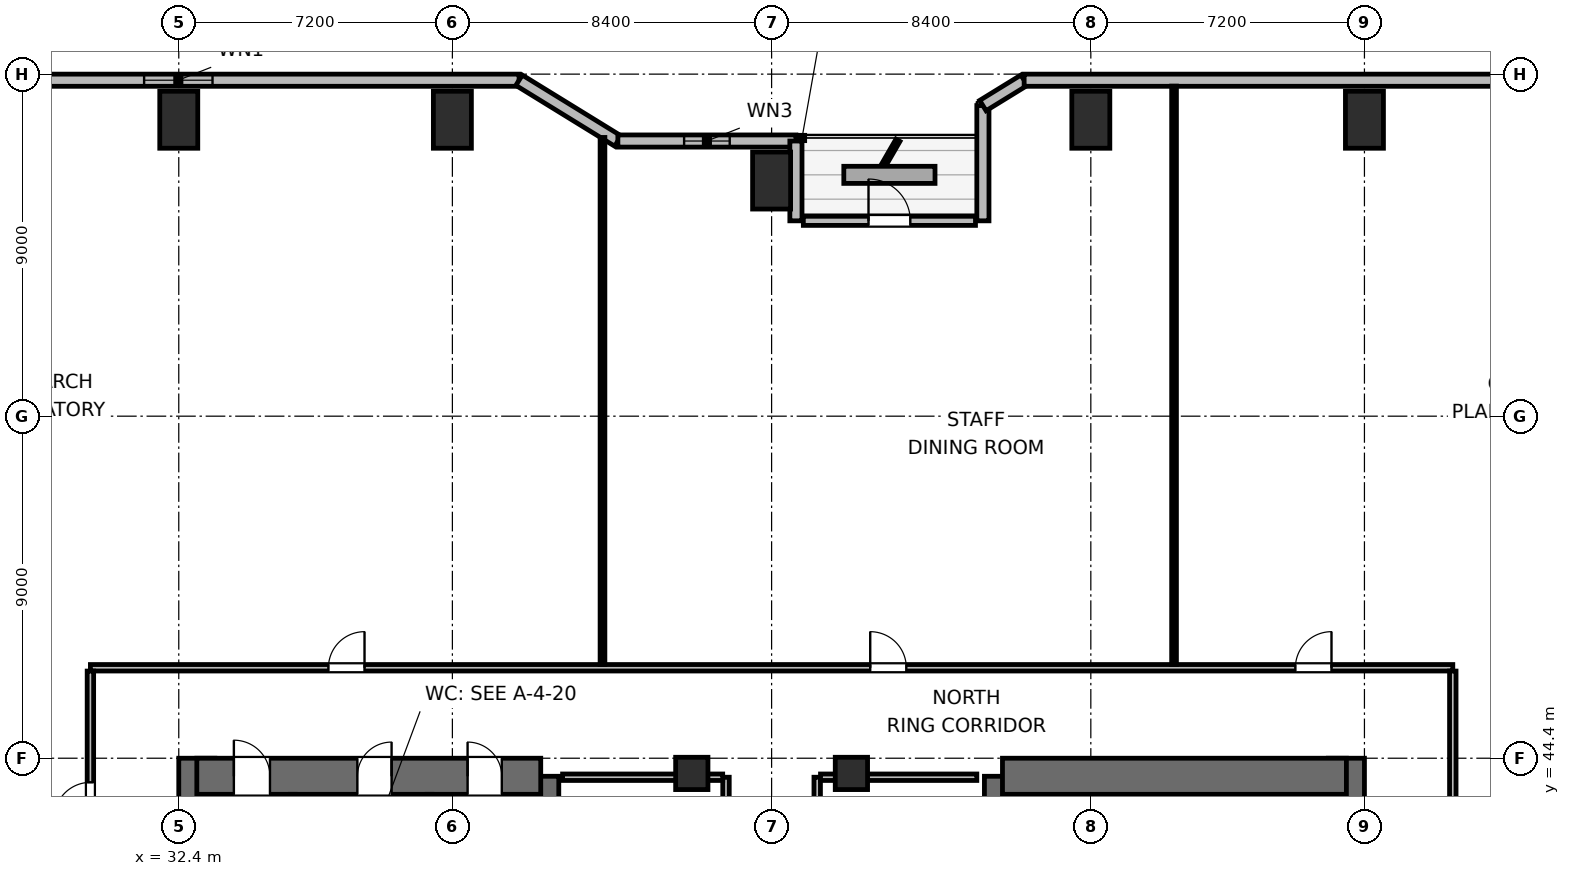
"""IFC4 building model, lengths in metres.
Left out: names, types, materials, properties, quantities, classifications, styles, units other than length and angle.
Written with IfcOpenShell. Run it as: python <this file> out.ifc"""

import sys

from ifc_helpers import new_model, si_unit, direction, frame, frame_2d, origin, origin_2d, place, context, subcontext, project, spatial, rectangle, extrude, element, fill, save


model = new_model("IFC4")
c1 = context("Model", 3, precision=1e-05, world=origin(), true_north=direction((0.0, 1.0)))
c2 = subcontext(c1, "Body", "Model", "MODEL_VIEW")
j1 = project(units=[si_unit("LENGTHUNIT", "METRE"), si_unit("PLANEANGLEUNIT", "RADIAN")], contexts=[c1])
p1 = place(None, origin())
s1 = spatial("IfcSite", under=j1, at=p1, CompositionType="ELEMENT")
p2 = place(p1, origin())
s2 = spatial("IfcBuilding", under=s1, at=p2, CompositionType="ELEMENT")
p3 = place(p2, frame((0.0, 0.0, 68.4)))
s3 = spatial("IfcBuildingStorey", under=s2, at=p3, CompositionType="ELEMENT", Elevation=68.4)
p4 = place(p3, frame((32.875, 27.6, 0.0), z_axis=(0.0, 0.0, 1.0), x_axis=(0.0, 1.0, 0.0)))
e1 = element("IfcWall", 1, at=p4, inside=s3, PredefinedType="SHEAR", context=c2, shape_type="SweptSolid", body=[
    extrude(rectangle(XDim=16.8, YDim=0.95, at=frame_2d((8.4, 0.0))), origin(), (0.0, 0.0, 1.0), 4.5),
])
p5 = place(p3, frame((41.925, 37.8, 0.0), z_axis=(0.0, 0.0, 1.0), x_axis=(0.0, 1.0, 0.0)))
e2 = element("IfcWall", 2, at=p5, inside=s3, PredefinedType="SHEAR", context=c2, shape_type="SweptSolid", body=[
    extrude(rectangle(XDim=6.125, YDim=0.95, at=frame_2d((3.062, 0.0))), origin(), (0.0, 0.0, 1.0), 4.5),
])
p6 = place(p3, frame((32.875, 43.925, 0.0), z_axis=(0.0, 0.0, 1.0), x_axis=(1.0, 0.0, 0.0)))
e3 = element("IfcWall", 3, at=p6, inside=s3, PredefinedType="SHEAR", context=c2, shape_type="SweptSolid", body=[
    extrude(rectangle(XDim=9.05, YDim=0.95, at=frame_2d((4.525, 0.0))), origin(), (0.0, 0.0, 1.0), 4.5),
])
p7 = place(p6, frame((0.975, 0.0, 0.0)))
e4 = element("IfcOpeningElement", 4, at=p7, cuts=e3, PredefinedType="OPENING", context=c2, shape_type="SweptSolid", body=[
    extrude(rectangle(XDim=0.95, YDim=2.04, at=frame_2d((0.475, 1.02))), frame((0.0, 0.485, 0.0), z_axis=(0.0, -1.0, 0.0), x_axis=(1.0, 0.0, 0.0)), (0.0, 0.0, 1.0), 0.97),
])
p8 = place(p6, frame((4.225, 0.0, 0.0)))
e5 = element("IfcOpeningElement", 5, at=p8, cuts=e3, PredefinedType="OPENING", context=c2, shape_type="SweptSolid", body=[
    extrude(rectangle(XDim=0.9, YDim=2.02, at=frame_2d((0.45, 1.01))), frame((0.0, 0.485, 0.0), z_axis=(0.0, -1.0, 0.0), x_axis=(1.0, 0.0, 0.0)), (0.0, 0.0, 1.0), 0.97),
])
p9 = place(p6, frame((7.125, 0.0, 0.0)))
e6 = element("IfcOpeningElement", 6, at=p9, cuts=e3, PredefinedType="OPENING", context=c2, shape_type="SweptSolid", body=[
    extrude(rectangle(XDim=0.9, YDim=2.02, at=frame_2d((0.45, 1.01))), frame((0.0, 0.485, 0.0), z_axis=(0.0, -1.0, 0.0), x_axis=(1.0, 0.0, 0.0)), (0.0, 0.0, 1.0), 0.97),
])
p10 = place(p3, frame((54.075, 38.0, 0.0), z_axis=(0.0, 0.0, 1.0), x_axis=(0.0, 1.0, 0.0)))
e7 = element("IfcWall", 7, at=p10, inside=s3, PredefinedType="SHEAR", context=c2, shape_type="SweptSolid", body=[
    extrude(rectangle(XDim=5.925, YDim=0.95, at=frame_2d((2.962, 0.0))), origin(), (0.0, 0.0, 1.0), 4.5),
])
p11 = place(p3, frame((63.125, 27.6, 0.0), z_axis=(0.0, 0.0, 1.0), x_axis=(0.0, 1.0, 0.0)))
e8 = element("IfcWall", 8, at=p11, inside=s3, PredefinedType="SHEAR", context=c2, shape_type="SweptSolid", body=[
    extrude(rectangle(XDim=16.8, YDim=0.95, at=frame_2d((8.4, 0.0))), origin(), (0.0, 0.0, 1.0), 4.5),
])
p12 = place(p3, frame((54.075, 43.925, 0.0), z_axis=(0.0, 0.0, 1.0), x_axis=(1.0, 0.0, 0.0)))
e9 = element("IfcWall", 9, at=p12, inside=s3, PredefinedType="SHEAR", context=c2, shape_type="SweptSolid", body=[
    extrude(rectangle(XDim=9.05, YDim=0.95, at=frame_2d((4.525, 0.0))), origin(), (0.0, 0.0, 1.0), 4.5),
])
for number, where, z_axis, x_axis in (
    (10, (32.4, 61.2, 0.0), (0.0, 0.0, 1.0), (1.0, 0.0, 0.0)),
    (11, (39.6, 61.2, 0.0), (0.0, 0.0, 1.0), (1.0, 0.0, 0.0)),
    (12, (48.0, 59.6, 0.0), (0.0, 0.0, 1.0), (1.0, 0.0, 0.0)),
    (13, (56.4, 61.2, 0.0), (0.0, 0.0, 1.0), (1.0, 0.0, 0.0)),
    (14, (63.6, 61.2, 0.0), (0.0, 0.0, 1.0), (1.0, 0.0, 0.0)),
):
    element("IfcColumn", number, at=place(p3, frame(where, z_axis=z_axis, x_axis=x_axis)), inside=s3, PredefinedType="COLUMN", context=c2, shape_type="SweptSolid", body=[
        extrude(rectangle(XDim=1.0, YDim=1.5, at=origin_2d()), origin(), (0.0, 0.0, 1.0), 4.5),
    ])
for number, where, z_axis, x_axis in (
    (15, (45.9, 44.0, 0.0), (0.0, 0.0, 1.0), (1.0, 0.0, 0.0)),
    (16, (50.1, 44.0, 0.0), (0.0, 0.0, 1.0), (1.0, 0.0, 0.0)),
):
    element("IfcColumn", number, at=place(p3, frame(where, z_axis=z_axis, x_axis=x_axis)), inside=s3, PredefinedType="COLUMN", context=c2, shape_type="SweptSolid", body=[
        extrude(rectangle(XDim=0.85, YDim=0.85, at=origin_2d()), origin(), (0.0, 0.0, 1.0), 4.5),
    ])
p13 = place(p3, frame((23.421, 62.24, 0.0), z_axis=(0.0, 0.0, 1.0), x_axis=(1.0, 0.0, 0.0)))
e17 = element("IfcWall", 17, at=p13, inside=s3, PredefinedType="SOLIDWALL", context=c2, shape_type="SweptSolid", body=[
    extrude(rectangle(XDim=17.934, YDim=0.32, at=frame_2d((8.967, 0.0))), origin(), (0.0, 0.0, 1.0), 4.24),
])
p14 = place(p13, frame((8.067, 0.0, 0.85)))
e18 = element("IfcOpeningElement", 18, at=p14, cuts=e17, PredefinedType="OPENING", context=c2, shape_type="SweptSolid", body=[
    extrude(rectangle(XDim=1.8, YDim=1.1, at=frame_2d((0.9, 0.55))), frame((0.0, 0.17, 0.0), z_axis=(0.0, -1.0, 0.0), x_axis=(1.0, 0.0, 0.0)), (0.0, 0.0, 1.0), 0.34),
])
p15 = place(p3, frame((41.355, 62.24, 0.0), z_axis=(0.0, 0.0, 1.0), x_axis=(0.851630857047, -0.524142044989, 0.0)))
e19 = element("IfcWall", 19, at=p15, inside=s3, PredefinedType="SOLIDWALL", context=c2, shape_type="SweptSolid", body=[
    extrude(rectangle(XDim=3.053, YDim=0.32, at=frame_2d((1.526, 0.0))), origin(), (0.0, 0.0, 1.0), 3.475),
])
p16 = place(p3, frame((43.955, 60.64, 0.0), z_axis=(0.0, 0.0, 1.0), x_axis=(1.0, 0.0, 0.0)))
e20 = element("IfcWall", 20, at=p16, inside=s3, PredefinedType="SOLIDWALL", context=c2, shape_type="SweptSolid", body=[
    extrude(rectangle(XDim=4.685, YDim=0.32, at=frame_2d((2.343, 0.0))), origin(), (0.0, 0.0, 1.0), 3.475),
])
p17 = place(p16, frame((1.743, 0.0, 0.85)))
e21 = element("IfcOpeningElement", 21, at=p17, cuts=e20, PredefinedType="OPENING", context=c2, shape_type="SweptSolid", body=[
    extrude(rectangle(XDim=1.2, YDim=1.1, at=frame_2d((0.6, 0.55))), frame((0.0, 0.17, 0.0), z_axis=(0.0, -1.0, 0.0), x_axis=(1.0, 0.0, 0.0)), (0.0, 0.0, 1.0), 0.34),
])
p18 = place(p3, frame((48.64, 60.64, 0.0), z_axis=(0.0, 0.0, 1.0), x_axis=(0.0, -1.0, 0.0)))
e22 = element("IfcWall", 22, at=p18, inside=s3, PredefinedType="SOLIDWALL", context=c2, shape_type="SweptSolid", body=[
    extrude(rectangle(XDim=2.1, YDim=0.32, at=frame_2d((1.05, 0.0))), origin(), (0.0, 0.0, 1.0), 3.475),
])
p19 = place(p3, frame((48.835, 58.54, 0.0), z_axis=(0.0, 0.0, 1.0), x_axis=(1.0, 0.0, 0.0)))
e23 = element("IfcWall", 23, at=p19, inside=s3, PredefinedType="SOLIDWALL", context=c2, shape_type="SweptSolid", body=[
    extrude(rectangle(XDim=4.53, YDim=0.24, at=frame_2d((2.265, 0.0))), origin(), (0.0, 0.0, 1.0), 4.24),
])
p20 = place(p19, frame((1.715, 0.0, 0.0)))
e24 = element("IfcOpeningElement", 24, at=p20, cuts=e23, PredefinedType="OPENING", context=c2, shape_type="SweptSolid", body=[
    extrude(rectangle(XDim=1.1, YDim=2.04, at=frame_2d((0.55, 1.02))), frame((0.0, 0.13, 0.0), z_axis=(0.0, -1.0, 0.0), x_axis=(1.0, 0.0, 0.0)), (0.0, 0.0, 1.0), 0.26),
])
p21 = place(p3, frame((53.56, 58.54, 0.0), z_axis=(0.0, 0.0, 1.0), x_axis=(0.0, 1.0, 0.0)))
e25 = element("IfcWall", 25, at=p21, inside=s3, PredefinedType="SOLIDWALL", context=c2, shape_type="SweptSolid", body=[
    extrude(rectangle(XDim=3.032, YDim=0.32, at=frame_2d((1.516, 0.0))), origin(), (0.0, 0.0, 1.0), 3.475),
])
p22 = place(p3, frame((53.56, 61.573, 0.0), z_axis=(0.0, 0.0, 1.0), x_axis=(0.851776724646, 0.523904964045, 0.0)))
e26 = element("IfcWall", 26, at=p22, inside=s3, PredefinedType="SOLIDWALL", context=c2, shape_type="SweptSolid", body=[
    extrude(rectangle(XDim=1.274, YDim=0.32, at=frame_2d((0.637, 0.0))), origin(), (0.0, 0.0, 1.0), 4.24),
])
p23 = place(p3, frame((54.645, 62.24, 0.0), z_axis=(0.0, 0.0, 1.0), x_axis=(1.0, 0.0, 0.0)))
e27 = element("IfcWall", 27, at=p23, inside=s3, PredefinedType="SOLIDWALL", context=c2, shape_type="SweptSolid", body=[
    extrude(rectangle(XDim=19.134, YDim=0.32, at=frame_2d((9.567, 0.0))), origin(), (0.0, 0.0, 1.0), 4.24),
])
for number, where, z_axis, x_axis in (
    (28, (35.4, 41.095, 0.0), (0.0, 0.0, 1.0), (0.0, 1.0, 0.0)),
    (29, (39.0, 41.095, 0.0), (0.0, 0.0, 1.0), (0.0, 1.0, 0.0)),
):
    element("IfcWall", number, at=place(p3, frame(where, z_axis=z_axis, x_axis=x_axis)), inside=s3, PredefinedType="PARTITIONING", context=c2, shape_type="SweptSolid", body=[
        extrude(rectangle(XDim=2.355, YDim=0.125, at=frame_2d((1.177, 0.0))), origin(), (0.0, 0.0, 1.0), 4.24),
    ])
p24 = place(p3, frame((46.8, 37.9, 0.0), z_axis=(0.0, 0.0, 1.0), x_axis=(0.0, 1.0, 0.0)))
e30 = element("IfcWall", 30, at=p24, inside=s3, PredefinedType="PARTITIONING", context=c2, shape_type="SweptSolid", body=[
    extrude(rectangle(XDim=6.0, YDim=0.17, at=frame_2d((3.0, 0.0))), origin(), (0.0, 0.0, 1.0), 4.24),
])
p25 = place(p24, frame((1.47, 0.0, 0.0)))
e31 = element("IfcOpeningElement", 31, at=p25, cuts=e30, PredefinedType="OPENING", context=c2, shape_type="SweptSolid", body=[
    extrude(rectangle(XDim=0.9, YDim=2.02, at=frame_2d((0.45, 1.01))), frame((0.0, 0.095, 0.0), z_axis=(0.0, -1.0, 0.0), x_axis=(1.0, 0.0, 0.0)), (0.0, 0.0, 1.0), 0.19),
])
p26 = place(p24, frame((4.47, 0.0, 0.0)))
e32 = element("IfcOpeningElement", 32, at=p26, cuts=e30, PredefinedType="OPENING", context=c2, shape_type="SweptSolid", body=[
    extrude(rectangle(XDim=0.9, YDim=2.02, at=frame_2d((0.45, 1.01))), frame((0.0, 0.095, 0.0), z_axis=(0.0, -1.0, 0.0), x_axis=(1.0, 0.0, 0.0)), (0.0, 0.0, 1.0), 0.19),
])
p27 = place(p3, frame((42.5, 43.9, 0.0), z_axis=(0.0, 0.0, 1.0), x_axis=(1.0, 0.0, 0.0)))
e33 = element("IfcWall", 33, at=p27, inside=s3, PredefinedType="PARTITIONING", context=c2, shape_type="SweptSolid", body=[
    extrude(rectangle(XDim=4.213, YDim=0.17, at=frame_2d((2.106, 0.0))), origin(), (0.0, 0.0, 1.0), 3.125),
])
p28 = place(p3, frame((49.2, 37.9, 0.0), z_axis=(0.0, 0.0, 1.0), x_axis=(0.0, 1.0, 0.0)))
e34 = element("IfcWall", 34, at=p28, inside=s3, PredefinedType="PARTITIONING", context=c2, shape_type="SweptSolid", body=[
    extrude(rectangle(XDim=6.0, YDim=0.17, at=frame_2d((3.0, 0.0))), origin(), (0.0, 0.0, 1.0), 4.24),
])
p29 = place(p28, frame((2.55, 0.0, 0.0)))
e35 = element("IfcOpeningElement", 35, at=p29, cuts=e34, PredefinedType="OPENING", context=c2, shape_type="SweptSolid", body=[
    extrude(rectangle(XDim=0.9, YDim=2.02, at=frame_2d((0.45, 1.01))), frame((0.0, 0.095, 0.0), z_axis=(0.0, -1.0, 0.0), x_axis=(1.0, 0.0, 0.0)), (0.0, 0.0, 1.0), 0.19),
])
p30 = place(p3, frame((49.287, 43.9, 0.0), z_axis=(0.0, 0.0, 1.0), x_axis=(1.0, 0.0, 0.0)))
e36 = element("IfcWall", 36, at=p30, inside=s3, PredefinedType="PARTITIONING", context=c2, shape_type="SweptSolid", body=[
    extrude(rectangle(XDim=4.113, YDim=0.17, at=frame_2d((2.056, 0.0))), origin(), (0.0, 0.0, 1.0), 3.125),
])
p31 = place(p3, frame((30.075, 46.78, 0.0), z_axis=(0.0, 0.0, 1.0), x_axis=(1.0, 0.0, 0.0)))
e37 = element("IfcWall", 37, at=p31, inside=s3, PredefinedType="PARTITIONING", context=c2, shape_type="SweptSolid", body=[
    extrude(rectangle(XDim=35.85, YDim=0.17, at=frame_2d((17.925, 0.0))), origin(), (0.0, 0.0, 1.0), 4.24),
])
p32 = place(p31, frame((6.263, 0.0, 0.0)))
e38 = element("IfcOpeningElement", 38, at=p32, cuts=e37, PredefinedType="OPENING", context=c2, shape_type="SweptSolid", body=[
    extrude(rectangle(XDim=0.95, YDim=2.04, at=frame_2d((0.475, 1.02))), frame((0.0, 0.095, 0.0), z_axis=(0.0, -1.0, 0.0), x_axis=(1.0, 0.0, 0.0)), (0.0, 0.0, 1.0), 0.19),
])
p33 = place(p31, frame((20.52, 0.0, 0.0)))
e39 = element("IfcOpeningElement", 39, at=p33, cuts=e37, PredefinedType="OPENING", context=c2, shape_type="SweptSolid", body=[
    extrude(rectangle(XDim=0.95, YDim=2.04, at=frame_2d((0.475, 1.02))), frame((0.0, 0.095, 0.0), z_axis=(0.0, -1.0, 0.0), x_axis=(1.0, 0.0, 0.0)), (0.0, 0.0, 1.0), 0.19),
])
p34 = place(p31, frame((31.708, 0.0, 0.0)))
e40 = element("IfcOpeningElement", 40, at=p34, cuts=e37, PredefinedType="OPENING", context=c2, shape_type="SweptSolid", body=[
    extrude(rectangle(XDim=0.95, YDim=2.04, at=frame_2d((0.475, 1.02))), frame((0.0, 0.095, 0.0), z_axis=(0.0, -1.0, 0.0), x_axis=(1.0, 0.0, 0.0)), (0.0, 0.0, 1.0), 0.19),
])
p35 = place(p3, frame((30.075, 25.307, 0.0), z_axis=(0.0, 0.0, 1.0), x_axis=(0.0, 1.0, 0.0)))
e41 = element("IfcWall", 41, at=p35, inside=s3, PredefinedType="PARTITIONING", context=c2, shape_type="SweptSolid", body=[
    extrude(rectangle(XDim=21.386, YDim=0.17, at=frame_2d((10.693, 0.0))), origin(), (0.0, 0.0, 1.0), 4.24),
])
p36 = place(p35, frame((3.528, 0.0, 0.0)))
e42 = element("IfcOpeningElement", 42, at=p36, cuts=e41, PredefinedType="OPENING", context=c2, shape_type="SweptSolid", body=[
    extrude(rectangle(XDim=0.95, YDim=2.04, at=frame_2d((0.475, 1.02))), frame((0.0, 0.095, 0.0), z_axis=(0.0, -1.0, 0.0), x_axis=(1.0, 0.0, 0.0)), (0.0, 0.0, 1.0), 0.19),
])
p37 = place(p35, frame((10.818, 0.0, 0.0)))
e43 = element("IfcOpeningElement", 43, at=p37, cuts=e41, PredefinedType="OPENING", context=c2, shape_type="SweptSolid", body=[
    extrude(rectangle(XDim=0.95, YDim=2.04, at=frame_2d((0.475, 1.02))), frame((0.0, 0.095, 0.0), z_axis=(0.0, -1.0, 0.0), x_axis=(1.0, 0.0, 0.0)), (0.0, 0.0, 1.0), 0.19),
])
p38 = place(p35, frame((17.508, 0.0, 0.0)))
e44 = element("IfcOpeningElement", 44, at=p38, cuts=e41, PredefinedType="OPENING", context=c2, shape_type="SweptSolid", body=[
    extrude(rectangle(XDim=0.95, YDim=2.04, at=frame_2d((0.475, 1.02))), frame((0.0, 0.095, 0.0), z_axis=(0.0, -1.0, 0.0), x_axis=(1.0, 0.0, 0.0)), (0.0, 0.0, 1.0), 0.19),
])
p39 = place(p3, frame((65.925, 25.307, 0.0), z_axis=(0.0, 0.0, 1.0), x_axis=(0.0, 1.0, 0.0)))
e45 = element("IfcWall", 45, at=p39, inside=s3, PredefinedType="PARTITIONING", context=c2, shape_type="SweptSolid", body=[
    extrude(rectangle(XDim=21.386, YDim=0.17, at=frame_2d((10.693, 0.0))), origin(), (0.0, 0.0, 1.0), 4.24),
])
p40 = place(p39, frame((4.328, 0.0, 0.0)))
e46 = element("IfcOpeningElement", 46, at=p40, cuts=e45, PredefinedType="OPENING", context=c2, shape_type="SweptSolid", body=[
    extrude(rectangle(XDim=0.95, YDim=2.04, at=frame_2d((0.475, 1.02))), frame((0.0, 0.095, 0.0), z_axis=(0.0, -1.0, 0.0), x_axis=(1.0, 0.0, 0.0)), (0.0, 0.0, 1.0), 0.19),
])
p41 = place(p39, frame((15.108, 0.0, 0.0)))
e47 = element("IfcOpeningElement", 47, at=p41, cuts=e45, PredefinedType="OPENING", context=c2, shape_type="SweptSolid", body=[
    extrude(rectangle(XDim=0.95, YDim=2.04, at=frame_2d((0.475, 1.02))), frame((0.0, 0.095, 0.0), z_axis=(0.0, -1.0, 0.0), x_axis=(1.0, 0.0, 0.0)), (0.0, 0.0, 1.0), 0.19),
])
p42 = place(p3, frame((43.55, 46.867, 0.0), z_axis=(0.0, 0.0, 1.0), x_axis=(0.0, 1.0, 0.0)))
e48 = element("IfcWall", 48, at=p42, inside=s3, PredefinedType="PARTITIONING", context=c2, shape_type="SweptSolid", body=[
    extrude(rectangle(XDim=13.867, YDim=0.125, at=frame_2d((6.934, 0.0))), origin(), (0.0, 0.0, 1.0), 3.603),
])
p43 = place(p3, frame((58.59, 46.867, 0.0), z_axis=(0.0, 0.0, 1.0), x_axis=(0.0, 1.0, 0.0)))
e49 = element("IfcWall", 49, at=p43, inside=s3, PredefinedType="PARTITIONING", context=c2, shape_type="SweptSolid", body=[
    extrude(rectangle(XDim=15.218, YDim=0.125, at=frame_2d((7.609, 0.0))), origin(), (0.0, 0.0, 1.0), 4.24),
])
p44 = place(p14, origin())
e50 = element("IfcWindow", 50, at=p44, inside=s3, PartitioningType="SINGLE_PANEL", PredefinedType="WINDOW", context=c2, shape_type="SweptSolid", body=[
    extrude(rectangle(XDim=1.8, YDim=1.1, at=frame_2d((0.9, 0.55))), frame((0.0, 0.03, 0.0), z_axis=(0.0, -1.0, 0.0), x_axis=(1.0, 0.0, 0.0)), (0.0, 0.0, 1.0), 0.06),
])
fill(e18, e50)
p45 = place(p17, origin())
e51 = element("IfcWindow", 51, at=p45, inside=s3, PartitioningType="SINGLE_PANEL", PredefinedType="WINDOW", context=c2, shape_type="SweptSolid", body=[
    extrude(rectangle(XDim=1.2, YDim=1.1, at=frame_2d((0.6, 0.55))), frame((0.0, 0.03, 0.0), z_axis=(0.0, -1.0, 0.0), x_axis=(1.0, 0.0, 0.0)), (0.0, 0.0, 1.0), 0.06),
])
fill(e21, e51)
p46 = place(p20, origin())
e52 = element("IfcDoor", 52, at=p46, inside=s3, OperationType="SINGLE_SWING_LEFT", PredefinedType="DOOR", context=c2, shape_type="SweptSolid", body=[
    extrude(rectangle(XDim=1.1, YDim=2.04, at=frame_2d((0.55, 1.02))), frame((0.0, 0.025, 0.0), z_axis=(0.0, -1.0, 0.0), x_axis=(1.0, 0.0, 0.0)), (0.0, 0.0, 1.0), 0.05),
])
fill(e24, e52)
p47 = place(p7, origin())
e53 = element("IfcDoor", 53, at=p47, inside=s3, OperationType="SINGLE_SWING_LEFT", PredefinedType="DOOR", context=c2, shape_type="SweptSolid", body=[
    extrude(rectangle(XDim=0.95, YDim=2.04, at=frame_2d((0.475, 1.02))), frame((0.0, 0.025, 0.0), z_axis=(0.0, -1.0, 0.0), x_axis=(1.0, 0.0, 0.0)), (0.0, 0.0, 1.0), 0.05),
])
fill(e4, e53)
p48 = place(p8, origin())
e54 = element("IfcDoor", 54, at=p48, inside=s3, OperationType="SINGLE_SWING_RIGHT", PredefinedType="DOOR", context=c2, shape_type="SweptSolid", body=[
    extrude(rectangle(XDim=0.9, YDim=2.02, at=frame_2d((0.45, 1.01))), frame((0.0, 0.025, 0.0), z_axis=(0.0, -1.0, 0.0), x_axis=(1.0, 0.0, 0.0)), (0.0, 0.0, 1.0), 0.05),
])
fill(e5, e54)
p49 = place(p9, origin())
e55 = element("IfcDoor", 55, at=p49, inside=s3, OperationType="SINGLE_SWING_LEFT", PredefinedType="DOOR", context=c2, shape_type="SweptSolid", body=[
    extrude(rectangle(XDim=0.9, YDim=2.02, at=frame_2d((0.45, 1.01))), frame((0.0, 0.025, 0.0), z_axis=(0.0, -1.0, 0.0), x_axis=(1.0, 0.0, 0.0)), (0.0, 0.0, 1.0), 0.05),
])
fill(e6, e55)
p50 = place(p32, origin())
e56 = element("IfcDoor", 56, at=p50, inside=s3, OperationType="SINGLE_SWING_RIGHT", PredefinedType="DOOR", context=c2, shape_type="SweptSolid", body=[
    extrude(rectangle(XDim=0.95, YDim=2.04, at=frame_2d((0.475, 1.02))), frame((0.0, 0.025, 0.0), z_axis=(0.0, -1.0, 0.0), x_axis=(1.0, 0.0, 0.0)), (0.0, 0.0, 1.0), 0.05),
])
fill(e38, e56)
p51 = place(p33, origin())
e57 = element("IfcDoor", 57, at=p51, inside=s3, OperationType="SINGLE_SWING_LEFT", PredefinedType="DOOR", context=c2, shape_type="SweptSolid", body=[
    extrude(rectangle(XDim=0.95, YDim=2.04, at=frame_2d((0.475, 1.02))), frame((0.0, 0.025, 0.0), z_axis=(0.0, -1.0, 0.0), x_axis=(1.0, 0.0, 0.0)), (0.0, 0.0, 1.0), 0.05),
])
fill(e39, e57)
p52 = place(p34, origin())
e58 = element("IfcDoor", 58, at=p52, inside=s3, OperationType="SINGLE_SWING_RIGHT", PredefinedType="DOOR", context=c2, shape_type="SweptSolid", body=[
    extrude(rectangle(XDim=0.95, YDim=2.04, at=frame_2d((0.475, 1.02))), frame((0.0, 0.025, 0.0), z_axis=(0.0, -1.0, 0.0), x_axis=(1.0, 0.0, 0.0)), (0.0, 0.0, 1.0), 0.05),
])
fill(e40, e58)
p53 = place(p38, origin())
e59 = element("IfcDoor", 59, at=p53, inside=s3, OperationType="SINGLE_SWING_LEFT", PredefinedType="DOOR", context=c2, shape_type="SweptSolid", body=[
    extrude(rectangle(XDim=0.95, YDim=2.04, at=frame_2d((0.475, 1.02))), frame((0.0, 0.025, 0.0), z_axis=(0.0, -1.0, 0.0), x_axis=(1.0, 0.0, 0.0)), (0.0, 0.0, 1.0), 0.05),
])
fill(e44, e59)
save(model, sys.argv[1])
